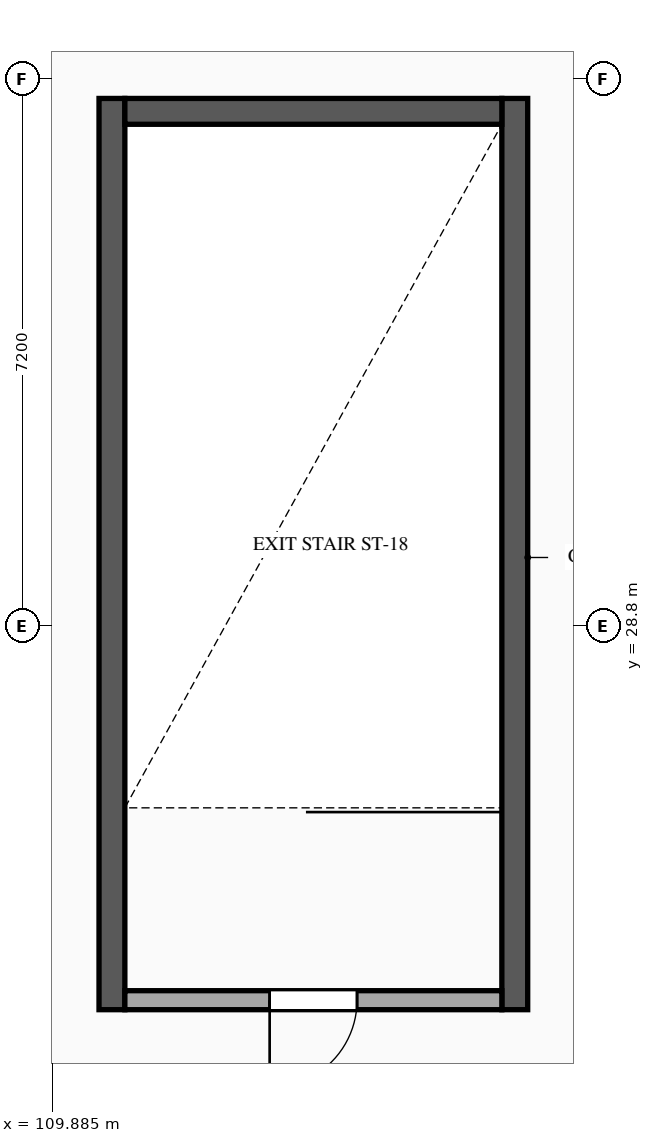
"""IFC4 building model, lengths in metres.
Left out: names, types, materials, properties, quantities, classifications, styles, units other than length and angle.
Written with IfcOpenShell. Run it as: python <this file> out.ifc"""

import sys

from ifc_helpers import new_model, si_unit, direction, frame, frame_2d, origin, place, context, subcontext, project, spatial, rectangle, extrude, element, fill, save


model = new_model("IFC4")
c1 = context("Model", 3, precision=1e-05, world=origin(), true_north=direction((0.0, 1.0)))
c2 = subcontext(c1, "Body", "Model", "MODEL_VIEW")
j1 = project(units=[si_unit("LENGTHUNIT", "METRE"), si_unit("PLANEANGLEUNIT", "RADIAN")], contexts=[c1])
p1 = place(None, origin())
s1 = spatial("IfcSite", under=j1, at=p1, CompositionType="ELEMENT")
p2 = place(p1, origin())
s2 = spatial("IfcBuilding", under=s1, at=p2, CompositionType="ELEMENT")
p3 = place(p2, origin())
s3 = spatial("IfcBuildingStorey", under=s2, at=p3, CompositionType="ELEMENT", Elevation=0.0)
for number, where, z_axis, x_axis in (
    (1, (110.67, 23.75, 0.0), (0.0, 0.0, 1.0), (0.0, 1.0, 0.0)),
    (2, (115.97, 35.74, 0.0), (0.0, 0.0, 1.0), (0.0, -1.0, 0.0)),
):
    element("IfcWall", number, at=place(p3, frame(where, z_axis=z_axis, x_axis=x_axis)), inside=s3, PredefinedType="SHEAR", context=c2, shape_type="SweptSolid", body=[
        extrude(rectangle(XDim=11.99, YDim=0.34, at=frame_2d((5.995, 0.0))), origin(), (0.0, 0.0, 1.0), 5.16),
    ])
p4 = place(p3, frame((110.84, 35.57, 0.0), z_axis=(0.0, 0.0, 1.0), x_axis=(1.0, 0.0, 0.0)))
e3 = element("IfcWall", 3, at=p4, inside=s3, PredefinedType="SHEAR", context=c2, shape_type="SweptSolid", body=[
    extrude(rectangle(XDim=4.96, YDim=0.34, at=frame_2d((2.48, 0.0))), origin(), (0.0, 0.0, 1.0), 5.16),
])
p5 = place(p3, frame((115.8, 23.875, 0.0), z_axis=(0.0, 0.0, 1.0), x_axis=(-1.0, 0.0, 0.0)))
e4 = element("IfcWall", 4, at=p5, inside=s3, PredefinedType="STANDARD", context=c2, shape_type="SweptSolid", body=[
    extrude(rectangle(XDim=4.96, YDim=0.25, at=frame_2d((2.48, 0.0))), origin(), (0.0, 0.0, 1.0), 5.08),
])
p6 = place(p5, frame((1.905, 0.0, 0.0)))
e5 = element("IfcOpeningElement", 5, at=p6, cuts=e4, PredefinedType="OPENING", context=c2, shape_type="SweptSolid", body=[
    extrude(rectangle(XDim=1.15, YDim=2.2, at=frame_2d((0.575, 1.1))), frame((0.0, 0.135, 0.0), z_axis=(0.0, -1.0, 0.0), x_axis=(1.0, 0.0, 0.0)), (0.0, 0.0, 1.0), 0.27),
])
p7 = place(p6, origin())
e6 = element("IfcDoor", 6, at=p7, inside=s3, OperationType="SINGLE_SWING_RIGHT", PredefinedType="DOOR", context=c2, shape_type="SweptSolid", body=[
    extrude(rectangle(XDim=1.15, YDim=2.2, at=frame_2d((0.575, 1.1))), frame((0.0, 0.025, 0.0), z_axis=(0.0, -1.0, 0.0), x_axis=(1.0, 0.0, 0.0)), (0.0, 0.0, 1.0), 0.05),
])
fill(e5, e6)
save(model, sys.argv[1])
